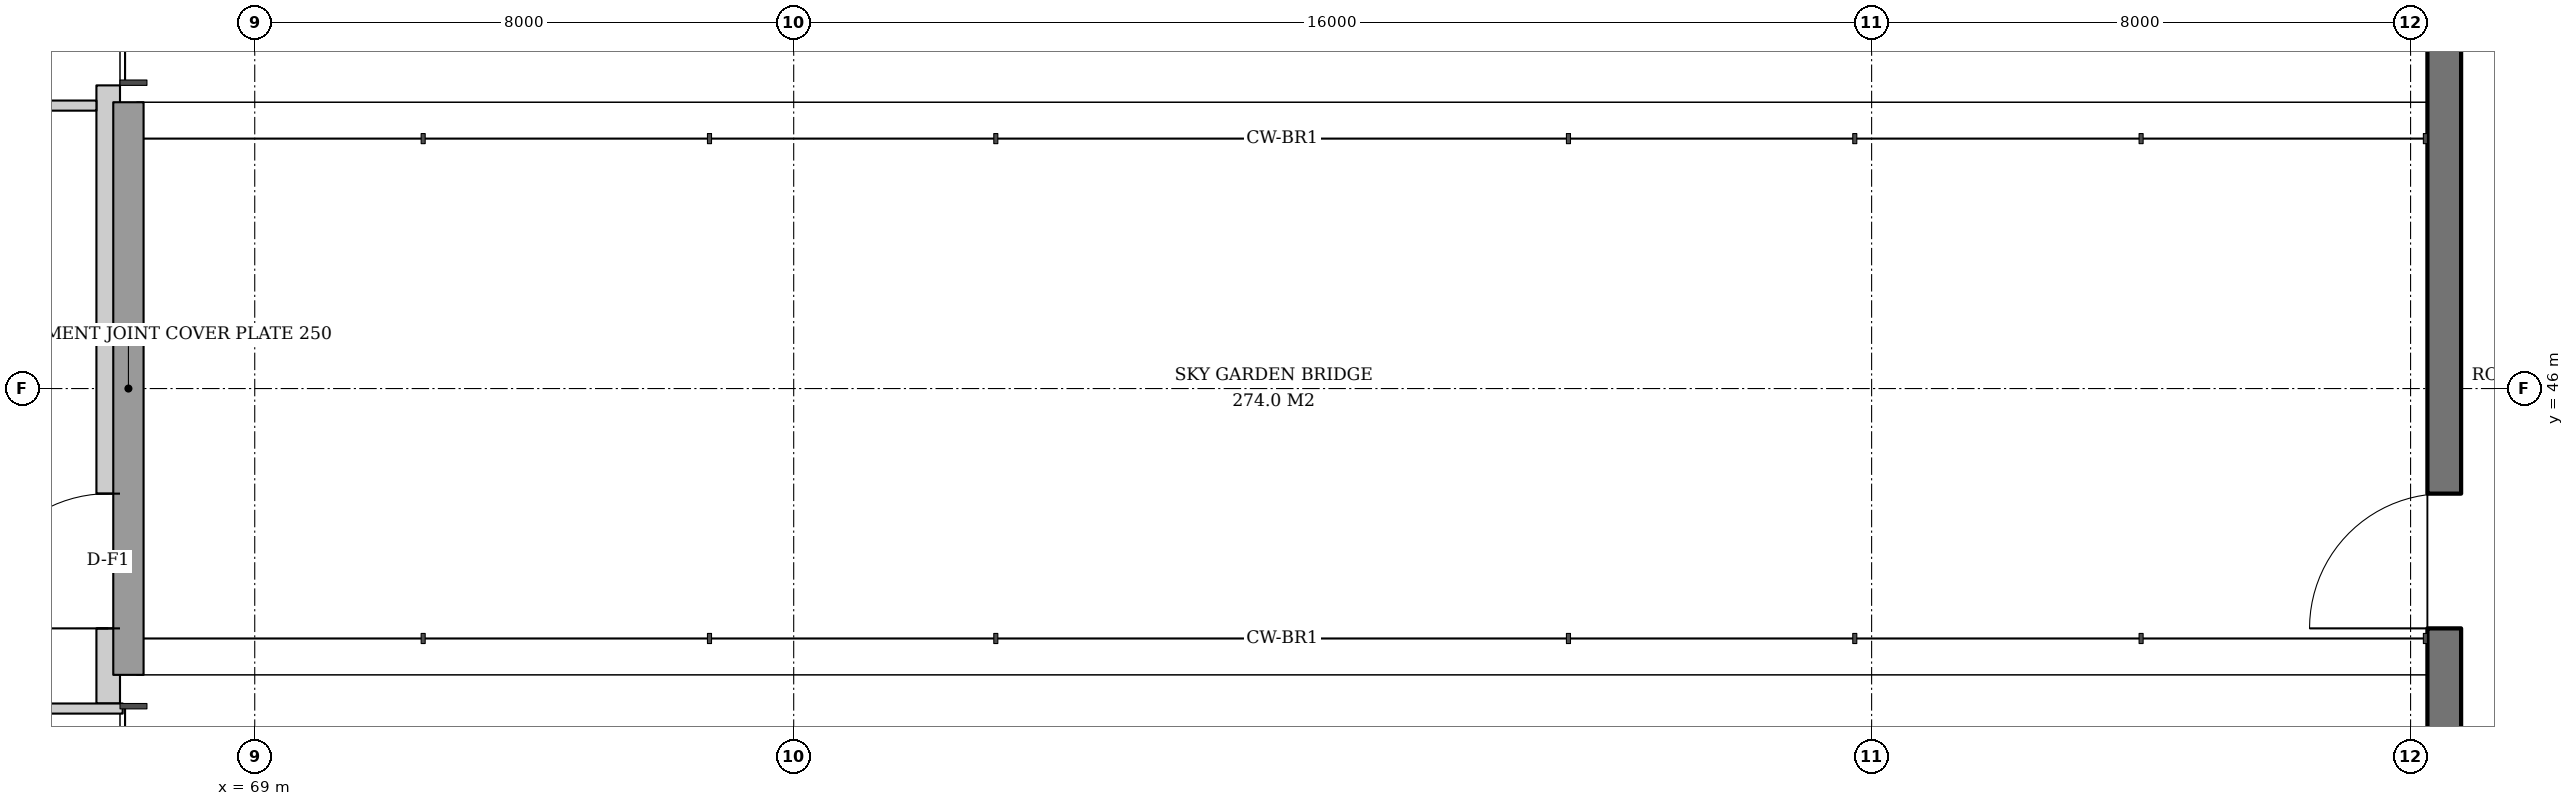
"""IFC4 building model, lengths in metres.
Left out: names, types, materials, properties, quantities, classifications, styles, units other than length and angle.
Written with IfcOpenShell. Run it as: python <this file> out.ifc"""

import sys

from ifc_helpers import new_model, si_unit, direction, frame, frame_2d, origin, place, context, subcontext, project, spatial, rectangle, extrude, element, fill, save


model = new_model("IFC4")
c1 = context("Model", 3, precision=1e-05, world=origin(), true_north=direction((0.0, 1.0)))
c2 = subcontext(c1, "Body", "Model", "MODEL_VIEW")
j1 = project(units=[si_unit("LENGTHUNIT", "METRE"), si_unit("PLANEANGLEUNIT", "RADIAN")], contexts=[c1])
p1 = place(None, origin())
s1 = spatial("IfcSite", under=j1, at=p1, CompositionType="ELEMENT")
p2 = place(p1, origin())
s2 = spatial("IfcBuilding", under=s1, at=p2, CompositionType="ELEMENT")
p3 = place(p2, frame((0.0, 0.0, 131.2)))
s3 = spatial("IfcBuildingStorey", under=s2, at=p3, CompositionType="ELEMENT", Elevation=131.2)
p4 = place(p3, frame((66.825, 41.325, 0.0), z_axis=(0.0, 0.0, 1.0), x_axis=(0.0, 1.0, 0.0)))
e1 = element("IfcWall", 1, at=p4, inside=s3, PredefinedType="SOLIDWALL", context=c2, shape_type="SweptSolid", body=[
    extrude(rectangle(XDim=9.175, YDim=0.35, at=frame_2d((4.587, 0.0))), origin(), (0.0, 0.0, 1.0), 3.62),
])
p5 = place(p4, frame((1.115, 0.0, 0.0)))
e2 = element("IfcOpeningElement", 2, at=p5, cuts=e1, PredefinedType="OPENING", context=c2, shape_type="SweptSolid", body=[
    extrude(rectangle(XDim=2.0, YDim=2.4, at=frame_2d((1.0, 1.2))), frame((0.0, 0.185, 0.0), z_axis=(0.0, -1.0, 0.0), x_axis=(1.0, 0.0, 0.0)), (0.0, 0.0, 1.0), 0.37),
])
p6 = place(p3, frame((101.5, 36.5, 0.0), z_axis=(0.0, 0.0, 1.0), x_axis=(0.0, 1.0, 0.0)))
e3 = element("IfcWall", 3, at=p6, inside=s3, PredefinedType="SOLIDWALL", context=c2, shape_type="SweptSolid", body=[
    extrude(rectangle(XDim=19.0, YDim=0.5, at=frame_2d((9.5, 0.0))), origin(), (0.0, 0.0, 1.0), 3.6),
])
p7 = place(p6, frame((5.94, 0.0, 0.0)))
e4 = element("IfcOpeningElement", 4, at=p7, cuts=e3, PredefinedType="OPENING", context=c2, shape_type="SweptSolid", body=[
    extrude(rectangle(XDim=2.0, YDim=2.4, at=frame_2d((1.0, 1.2))), frame((0.0, 0.26, 0.0), z_axis=(0.0, -1.0, 0.0), x_axis=(1.0, 0.0, 0.0)), (0.0, 0.0, 1.0), 0.52),
])
p8 = place(p3, frame((63.1, 41.25, 0.0), z_axis=(0.0, 0.0, 1.0), x_axis=(1.0, 0.0, 0.0)))
e5 = element("IfcWall", 5, at=p8, inside=s3, PredefinedType="PARTITIONING", context=c2, shape_type="SweptSolid", body=[
    extrude(rectangle(XDim=3.94, YDim=0.15, at=frame_2d((1.97, 0.0))), origin(), (0.0, 0.0, 1.0), 2.82),
])
p9 = place(p3, frame((63.025, 50.2, 0.0), z_axis=(0.0, 0.0, 1.0), x_axis=(1.0, 0.0, 0.0)))
e6 = element("IfcWall", 6, at=p9, inside=s3, PredefinedType="PARTITIONING", context=c2, shape_type="SweptSolid", body=[
    extrude(rectangle(XDim=3.625, YDim=0.15, at=frame_2d((1.812, 0.0))), origin(), (0.0, 0.0, 1.0), 2.82),
])
p10 = place(p5, origin())
e7 = element("IfcDoor", 7, at=p10, inside=s3, OperationType="DOUBLE_DOOR_SINGLE_SWING", PredefinedType="DOOR", context=c2, shape_type="SweptSolid", body=[
    extrude(rectangle(XDim=2.0, YDim=2.4, at=frame_2d((1.0, 1.2))), frame((0.0, 0.025, 0.0), z_axis=(0.0, -1.0, 0.0), x_axis=(1.0, 0.0, 0.0)), (0.0, 0.0, 1.0), 0.05),
])
fill(e2, e7)
p11 = place(p7, origin())
e8 = element("IfcDoor", 8, at=p11, inside=s3, OperationType="DOUBLE_DOOR_SINGLE_SWING", PredefinedType="DOOR", context=c2, shape_type="SweptSolid", body=[
    extrude(rectangle(XDim=2.0, YDim=2.4, at=frame_2d((1.0, 1.2))), frame((0.0, 0.025, 0.0), z_axis=(0.0, -1.0, 0.0), x_axis=(1.0, 0.0, 0.0)), (0.0, 0.0, 1.0), 0.05),
])
fill(e4, e8)
save(model, sys.argv[1])
